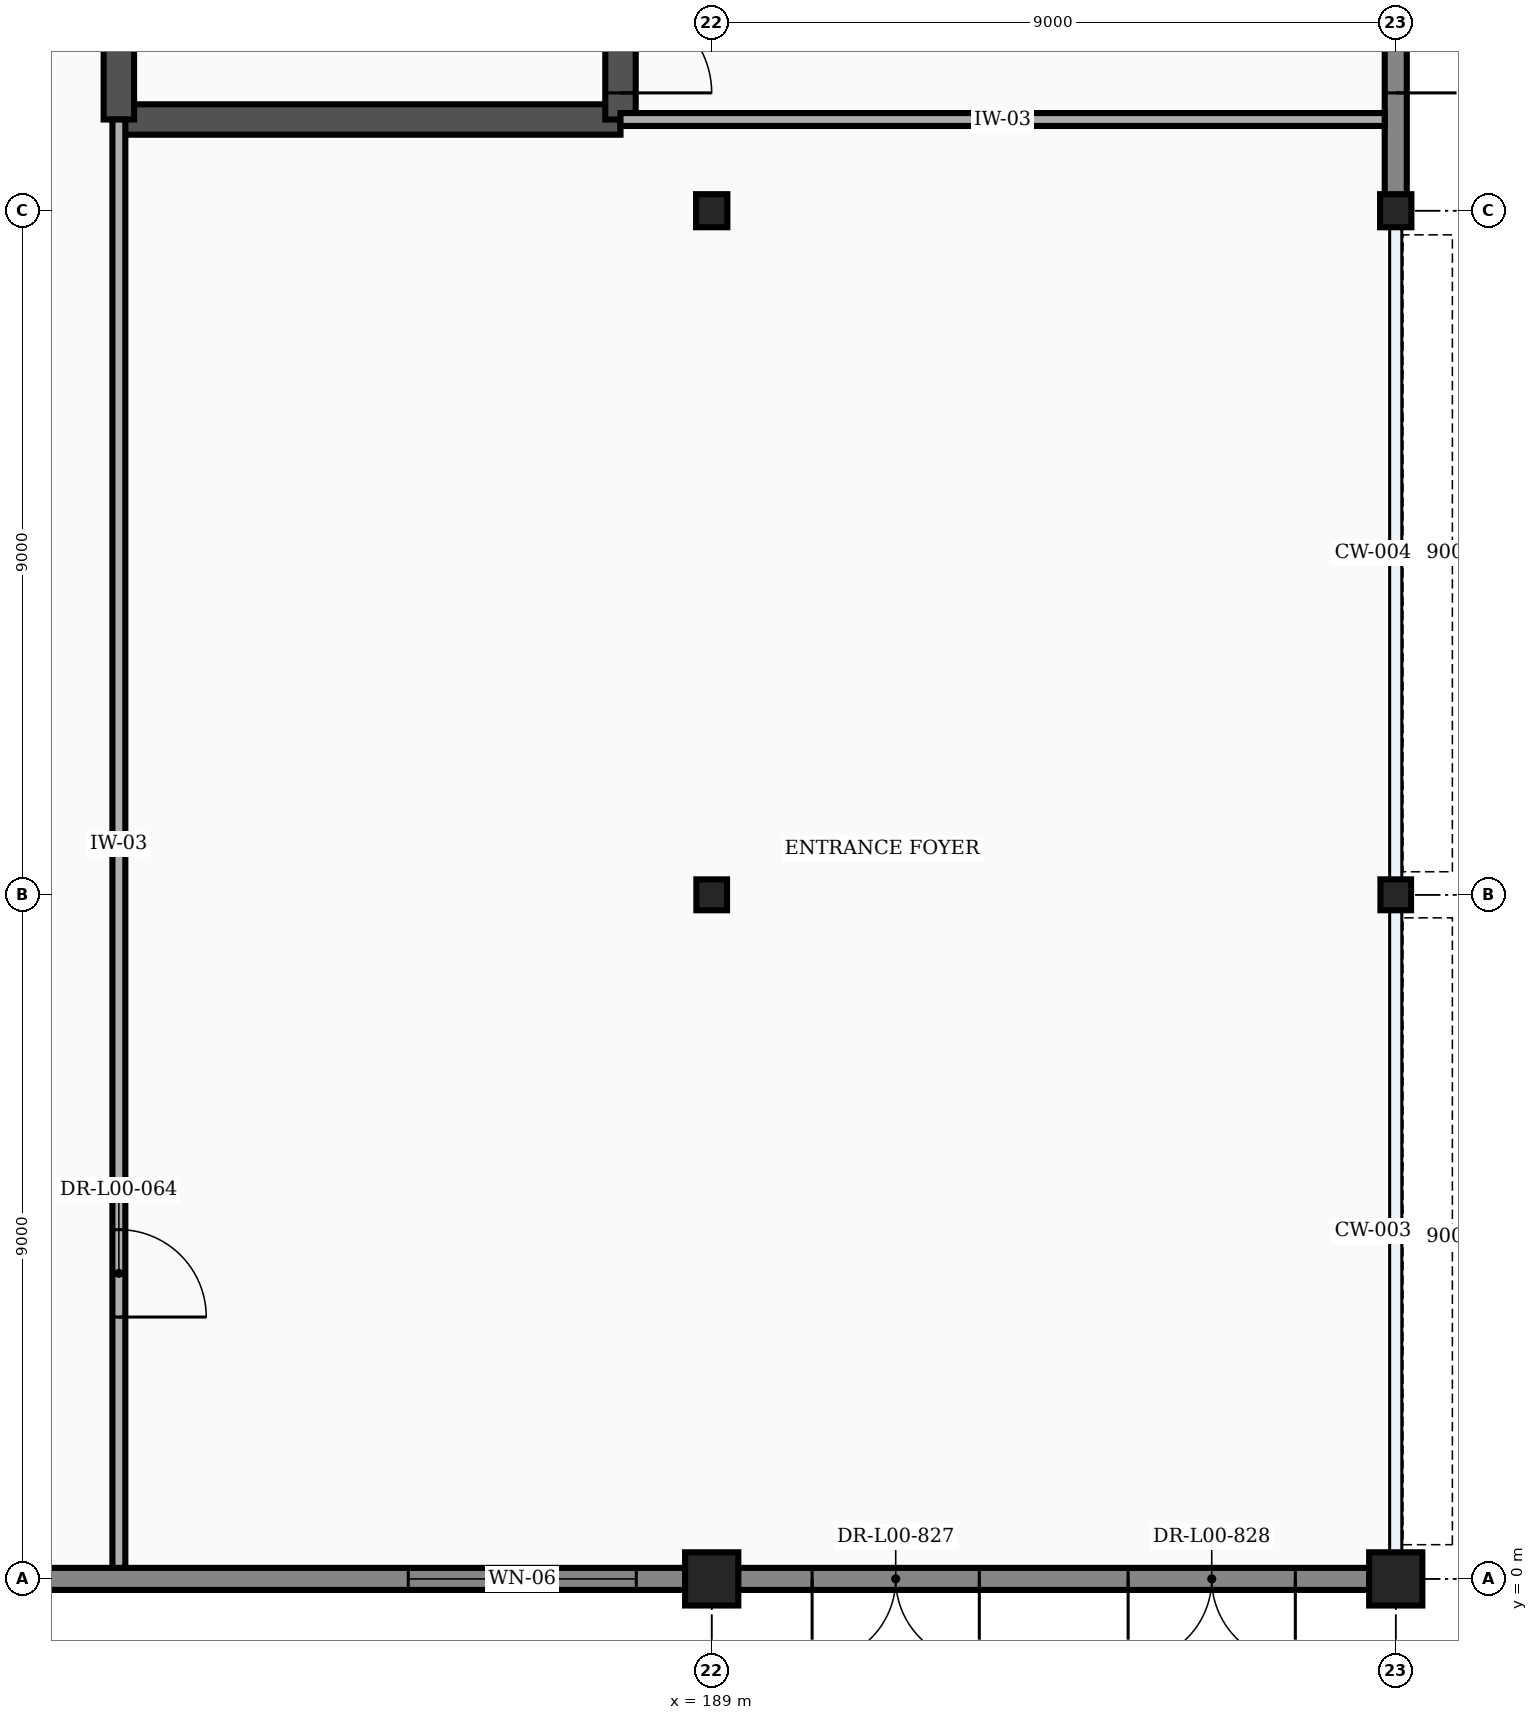
"""IFC4 building model, lengths in metres.
Left out: names, types, materials, properties, quantities, classifications, styles, units other than length and angle.
Written with IfcOpenShell. Run it as: python <this file> out.ifc"""

import sys

from ifc_helpers import new_model, si_unit, direction, frame, frame_2d, origin, origin_2d, place, context, subcontext, project, spatial, rectangle, i_section, extrude, element, fill, save


model = new_model("IFC4")
c1 = context("Model", 3, precision=1e-05, world=origin(), true_north=direction((0.0, 1.0)))
c2 = subcontext(c1, "Body", "Model", "MODEL_VIEW")
j1 = project(units=[si_unit("LENGTHUNIT", "METRE"), si_unit("PLANEANGLEUNIT", "RADIAN")], contexts=[c1])
p1 = place(None, origin())
s1 = spatial("IfcSite", under=j1, at=p1, CompositionType="ELEMENT")
p2 = place(p1, origin())
s2 = spatial("IfcBuilding", under=s1, at=p2, CompositionType="ELEMENT")
p3 = place(p2, origin())
s3 = spatial("IfcBuildingStorey", under=s2, at=p3, CompositionType="ELEMENT", Elevation=0.0)
p4 = place(p3, frame((189.0, 0.0, 0.0), z_axis=(0.0, 0.0, 1.0), x_axis=(1.0, 0.0, 0.0)))
e1 = element("IfcColumn", 1, at=p4, inside=s3, PredefinedType="COLUMN", context=c2, shape_type="SweptSolid", body=[
    extrude(rectangle(XDim=0.7, YDim=0.7, at=origin_2d()), origin(), (0.0, 0.0, 1.0), 6.0),
])
p5 = place(p3, frame((189.0, 9.0, 0.0), z_axis=(0.0, 0.0, 1.0), x_axis=(1.0, 0.0, 0.0)))
e2 = element("IfcColumn", 2, at=p5, inside=s3, PredefinedType="COLUMN", context=c2, shape_type="SweptSolid", body=[
    extrude(i_section(OverallWidth=0.403, OverallDepth=0.406, WebThickness=0.027, FlangeThickness=0.043, at=origin_2d()), origin(), (0.0, 0.0, 1.0), 6.0),
])
p6 = place(p3, frame((189.0, 18.0, 0.0), z_axis=(0.0, 0.0, 1.0), x_axis=(1.0, 0.0, 0.0)))
e3 = element("IfcColumn", 3, at=p6, inside=s3, PredefinedType="COLUMN", context=c2, shape_type="SweptSolid", body=[
    extrude(i_section(OverallWidth=0.412, OverallDepth=0.435, WebThickness=0.036, FlangeThickness=0.058, at=origin_2d()), origin(), (0.0, 0.0, 1.0), 6.0),
])
p7 = place(p3, frame((198.0, 0.0, 0.0), z_axis=(0.0, 0.0, 1.0), x_axis=(1.0, 0.0, 0.0)))
e4 = element("IfcColumn", 4, at=p7, inside=s3, PredefinedType="COLUMN", context=c2, shape_type="SweptSolid", body=[
    extrude(rectangle(XDim=0.7, YDim=0.7, at=origin_2d()), origin(), (0.0, 0.0, 1.0), 6.0),
])
p8 = place(p3, frame((198.0, 9.0, 0.0), z_axis=(0.0, 0.0, 1.0), x_axis=(1.0, 0.0, 0.0)))
e5 = element("IfcColumn", 5, at=p8, inside=s3, PredefinedType="COLUMN", context=c2, shape_type="SweptSolid", body=[
    extrude(i_section(OverallWidth=0.403, OverallDepth=0.406, WebThickness=0.027, FlangeThickness=0.043, at=origin_2d()), origin(), (0.0, 0.0, 1.0), 6.0),
])
p9 = place(p3, frame((198.0, 18.0, 0.0), z_axis=(0.0, 0.0, 1.0), x_axis=(1.0, 0.0, 0.0)))
e6 = element("IfcColumn", 6, at=p9, inside=s3, PredefinedType="COLUMN", context=c2, shape_type="SweptSolid", body=[
    extrude(i_section(OverallWidth=0.412, OverallDepth=0.435, WebThickness=0.036, FlangeThickness=0.058, at=origin_2d()), origin(), (0.0, 0.0, 1.0), 6.0),
])
p10 = place(p3, frame((171.342, 0.0, 0.0), z_axis=(0.0, 0.0, 1.0), x_axis=(1.0, 0.0, 0.0)))
e7 = element("IfcWall", 7, at=p10, inside=s3, PredefinedType="STANDARD", context=c2, shape_type="SweptSolid", body=[
    extrude(rectangle(XDim=17.316, YDim=0.29, at=frame_2d((8.658, 0.0))), origin(), (0.0, 0.0, 1.0), 4.988),
])
p11 = place(p10, frame((0.558, 0.0, 0.0)))
e8 = element("IfcOpeningElement", 8, at=p11, cuts=e7, PredefinedType="OPENING", context=c2, shape_type="SweptSolid", body=[
    extrude(rectangle(XDim=2.4, YDim=2.4, at=frame_2d((1.2, 1.2))), frame((0.0, 0.157, 0.0), z_axis=(0.0, -1.0, 0.0), x_axis=(1.0, 0.0, 0.0)), (0.0, 0.0, 1.0), 0.314),
])
p12 = place(p10, frame((3.458, 0.0, 0.0)))
e9 = element("IfcOpeningElement", 9, at=p12, cuts=e7, PredefinedType="OPENING", context=c2, shape_type="SweptSolid", body=[
    extrude(rectangle(XDim=2.4, YDim=2.4, at=frame_2d((1.2, 1.2))), frame((0.0, 0.157, 0.0), z_axis=(0.0, -1.0, 0.0), x_axis=(1.0, 0.0, 0.0)), (0.0, 0.0, 1.0), 0.314),
])
p13 = place(p10, frame((13.666, 0.0, 0.85)))
e10 = element("IfcOpeningElement", 10, at=p13, cuts=e7, PredefinedType="OPENING", context=c2, shape_type="SweptSolid", body=[
    extrude(rectangle(XDim=3.0, YDim=2.6, at=frame_2d((1.5, 1.3))), frame((0.0, 0.157, 0.0), z_axis=(0.0, -1.0, 0.0), x_axis=(1.0, 0.0, 0.0)), (0.0, 0.0, 1.0), 0.314),
])
p14 = place(p3, frame((189.342, 0.0, 0.0), z_axis=(0.0, 0.0, 1.0), x_axis=(1.0, 0.0, 0.0)))
e11 = element("IfcWall", 11, at=p14, inside=s3, PredefinedType="STANDARD", context=c2, shape_type="SweptSolid", body=[
    extrude(rectangle(XDim=8.316, YDim=0.29, at=frame_2d((4.158, 0.0))), origin(), (0.0, 0.0, 1.0), 5.138),
])
p15 = place(p14, frame((0.979, 0.0, 0.0)))
e12 = element("IfcOpeningElement", 12, at=p15, cuts=e11, PredefinedType="OPENING", context=c2, shape_type="SweptSolid", body=[
    extrude(rectangle(XDim=2.2, YDim=2.4, at=frame_2d((1.1, 1.2))), frame((0.0, 0.157, 0.0), z_axis=(0.0, -1.0, 0.0), x_axis=(1.0, 0.0, 0.0)), (0.0, 0.0, 1.0), 0.314),
])
p16 = place(p14, frame((5.137, 0.0, 0.0)))
e13 = element("IfcOpeningElement", 13, at=p16, cuts=e11, PredefinedType="OPENING", context=c2, shape_type="SweptSolid", body=[
    extrude(rectangle(XDim=2.2, YDim=2.4, at=frame_2d((1.1, 1.2))), frame((0.0, 0.157, 0.0), z_axis=(0.0, -1.0, 0.0), x_axis=(1.0, 0.0, 0.0)), (0.0, 0.0, 1.0), 0.314),
])
p17 = place(p3, frame((198.0, 18.198, 0.0), z_axis=(0.0, 0.0, 1.0), x_axis=(0.0, 1.0, 0.0)))
e14 = element("IfcWall", 14, at=p17, inside=s3, PredefinedType="STANDARD", context=c2, shape_type="SweptSolid", body=[
    extrude(rectangle(XDim=17.603, YDim=0.29, at=frame_2d((8.802, 0.0))), origin(), (0.0, 0.0, 1.0), 5.066),
])
p18 = place(p17, frame((1.352, 0.0, 0.0)))
e15 = element("IfcOpeningElement", 15, at=p18, cuts=e14, PredefinedType="OPENING", context=c2, shape_type="SweptSolid", body=[
    extrude(rectangle(XDim=3.5, YDim=2.4, at=frame_2d((1.75, 1.2))), frame((0.0, 0.157, 0.0), z_axis=(0.0, -1.0, 0.0), x_axis=(1.0, 0.0, 0.0)), (0.0, 0.0, 1.0), 0.314),
])
p19 = place(p17, frame((7.302, 0.0, 0.85)))
e16 = element("IfcOpeningElement", 16, at=p19, cuts=e14, PredefinedType="OPENING", context=c2, shape_type="SweptSolid", body=[
    extrude(rectangle(XDim=3.0, YDim=2.6, at=frame_2d((1.5, 1.3))), frame((0.0, 0.157, 0.0), z_axis=(0.0, -1.0, 0.0), x_axis=(1.0, 0.0, 0.0)), (0.0, 0.0, 1.0), 0.314),
])
p20 = place(p3, frame((181.2, 19.2, 0.0), z_axis=(0.0, 0.0, 1.0), x_axis=(1.0, 0.0, 0.0)))
e17 = element("IfcWall", 17, at=p20, inside=s3, PredefinedType="SHEAR", context=c2, shape_type="SweptSolid", body=[
    extrude(rectangle(XDim=6.6, YDim=0.4, at=frame_2d((3.3, 0.0))), origin(), (0.0, 0.0, 1.0), 5.75),
])
p21 = place(p3, frame((187.8, 19.2, 0.0), z_axis=(0.0, 0.0, 1.0), x_axis=(0.0, 1.0, 0.0)))
e18 = element("IfcWall", 18, at=p21, inside=s3, PredefinedType="SHEAR", context=c2, shape_type="SweptSolid", body=[
    extrude(rectangle(XDim=15.6, YDim=0.4, at=frame_2d((7.8, 0.0))), origin(), (0.0, 0.0, 1.0), 5.75),
])
p22 = place(p21, frame((0.35, 0.0, 0.0)))
e19 = element("IfcOpeningElement", 19, at=p22, cuts=e18, PredefinedType="OPENING", context=c2, shape_type="SweptSolid", body=[
    extrude(rectangle(XDim=2.4, YDim=2.25, at=frame_2d((1.2, 1.125))), frame((0.0, 0.212, 0.0), z_axis=(0.0, -1.0, 0.0), x_axis=(1.0, 0.0, 0.0)), (0.0, 0.0, 1.0), 0.424),
])
p23 = place(p3, frame((181.2, 19.2, 0.0), z_axis=(0.0, 0.0, 1.0), x_axis=(0.0, 1.0, 0.0)))
e20 = element("IfcWall", 20, at=p23, inside=s3, PredefinedType="SHEAR", context=c2, shape_type="SweptSolid", body=[
    extrude(rectangle(XDim=9.56, YDim=0.4, at=frame_2d((4.78, 0.0))), origin(), (0.0, 0.0, 1.0), 5.75),
])
p24 = place(p3, frame((187.8, 19.2, 0.0), z_axis=(0.0, 0.0, 1.0), x_axis=(1.0, 0.0, 0.0)))
e21 = element("IfcWall", 21, at=p24, inside=s3, PredefinedType="PARTITIONING", context=c2, shape_type="SweptSolid", body=[
    extrude(rectangle(XDim=10.055, YDim=0.17, at=frame_2d((5.027, 0.0))), origin(), (0.0, 0.0, 1.0), 5.75),
])
p25 = place(p3, frame((181.2, 0.145, 0.0), z_axis=(0.0, 0.0, 1.0), x_axis=(0.0, 1.0, 0.0)))
e22 = element("IfcWall", 22, at=p25, inside=s3, PredefinedType="PARTITIONING", context=c2, shape_type="SweptSolid", body=[
    extrude(rectangle(XDim=19.055, YDim=0.17, at=frame_2d((9.527, 0.0))), origin(), (0.0, 0.0, 1.0), 5.75),
])
p26 = place(p25, frame((3.3, 0.0, 0.0)))
e23 = element("IfcOpeningElement", 23, at=p26, cuts=e22, PredefinedType="OPENING", context=c2, shape_type="SweptSolid", body=[
    extrude(rectangle(XDim=1.15, YDim=2.15, at=frame_2d((0.575, 1.075))), frame((0.0, 0.097, 0.0), z_axis=(0.0, -1.0, 0.0), x_axis=(1.0, 0.0, 0.0)), (0.0, 0.0, 1.0), 0.194),
])
p27 = place(p13, origin())
e24 = element("IfcWindow", 24, at=p27, inside=s3, PartitioningType="SINGLE_PANEL", PredefinedType="WINDOW", context=c2, shape_type="SweptSolid", body=[
    extrude(rectangle(XDim=3.0, YDim=2.6, at=frame_2d((1.5, 1.3))), frame((0.0, 0.03, 0.0), z_axis=(0.0, -1.0, 0.0), x_axis=(1.0, 0.0, 0.0)), (0.0, 0.0, 1.0), 0.06),
])
fill(e10, e24)
p28 = place(p15, frame((2.2, 0.0, 0.0), z_axis=(0.0, 0.0, 1.0), x_axis=(-1.0, 0.0, 0.0)))
e25 = element("IfcDoor", 25, at=p28, inside=s3, OperationType="DOUBLE_DOOR_SINGLE_SWING", PredefinedType="DOOR", context=c2, shape_type="SweptSolid", body=[
    extrude(rectangle(XDim=2.2, YDim=2.4, at=frame_2d((1.1, 1.2))), frame((0.0, 0.025, 0.0), z_axis=(0.0, -1.0, 0.0), x_axis=(1.0, 0.0, 0.0)), (0.0, 0.0, 1.0), 0.05),
])
fill(e12, e25)
p29 = place(p16, frame((2.2, 0.0, 0.0), z_axis=(0.0, 0.0, 1.0), x_axis=(-1.0, 0.0, 0.0)))
e26 = element("IfcDoor", 26, at=p29, inside=s3, OperationType="DOUBLE_DOOR_SINGLE_SWING", PredefinedType="DOOR", context=c2, shape_type="SweptSolid", body=[
    extrude(rectangle(XDim=2.2, YDim=2.4, at=frame_2d((1.1, 1.2))), frame((0.0, 0.025, 0.0), z_axis=(0.0, -1.0, 0.0), x_axis=(1.0, 0.0, 0.0)), (0.0, 0.0, 1.0), 0.05),
])
fill(e13, e26)
p30 = place(p18, frame((3.5, 0.0, 0.0), z_axis=(0.0, 0.0, 1.0), x_axis=(-1.0, 0.0, 0.0)))
e27 = element("IfcDoor", 27, at=p30, inside=s3, OperationType="DOUBLE_DOOR_SINGLE_SWING", PredefinedType="DOOR", context=c2, shape_type="SweptSolid", body=[
    extrude(rectangle(XDim=3.5, YDim=2.4, at=frame_2d((1.75, 1.2))), frame((0.0, 0.025, 0.0), z_axis=(0.0, -1.0, 0.0), x_axis=(1.0, 0.0, 0.0)), (0.0, 0.0, 1.0), 0.05),
])
fill(e15, e27)
p31 = place(p22, frame((2.4, 0.0, 0.0), z_axis=(0.0, 0.0, 1.0), x_axis=(-1.0, 0.0, 0.0)))
e28 = element("IfcDoor", 28, at=p31, inside=s3, OperationType="DOUBLE_DOOR_SINGLE_SWING", PredefinedType="DOOR", context=c2, shape_type="SweptSolid", body=[
    extrude(rectangle(XDim=2.4, YDim=2.25, at=frame_2d((1.2, 1.125))), frame((0.0, 0.025, 0.0), z_axis=(0.0, -1.0, 0.0), x_axis=(1.0, 0.0, 0.0)), (0.0, 0.0, 1.0), 0.05),
])
fill(e19, e28)
p32 = place(p26, frame((1.15, 0.0, 0.0), z_axis=(0.0, 0.0, 1.0), x_axis=(-1.0, 0.0, 0.0)))
e29 = element("IfcDoor", 29, at=p32, inside=s3, OperationType="SINGLE_SWING_RIGHT", PredefinedType="DOOR", context=c2, shape_type="SweptSolid", body=[
    extrude(rectangle(XDim=1.15, YDim=2.15, at=frame_2d((0.575, 1.075))), frame((0.0, 0.025, 0.0), z_axis=(0.0, -1.0, 0.0), x_axis=(1.0, 0.0, 0.0)), (0.0, 0.0, 1.0), 0.05),
])
fill(e23, e29)
save(model, sys.argv[1])
